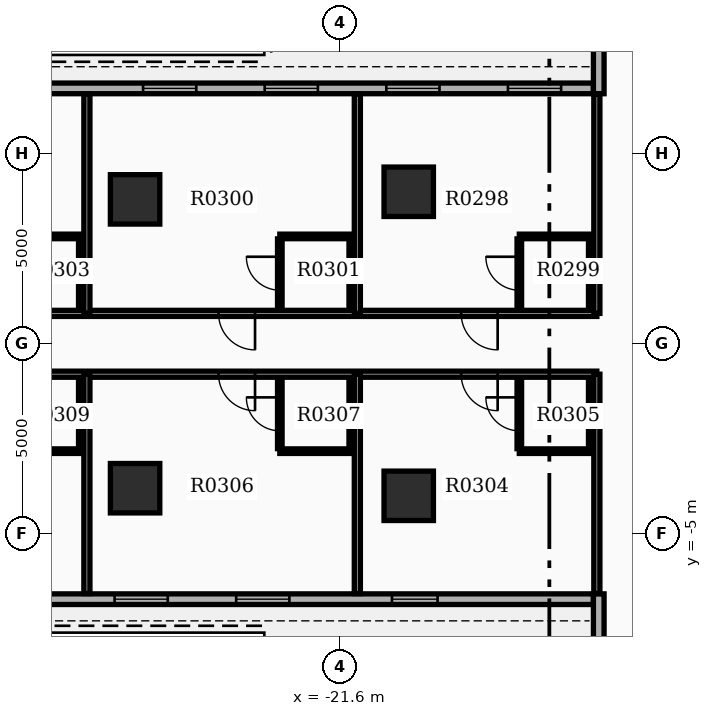
"""IFC4 building model, lengths in metres.
Left out: names, types, materials, properties, quantities, classifications, styles, units other than length and angle.
Written with IfcOpenShell. Run it as: python <this file> out.ifc"""

import sys

from ifc_helpers import new_model, si_unit, direction, frame, frame_2d, origin, origin_2d, place, context, subcontext, project, spatial, rectangle, extrude, element, fill, save


model = new_model("IFC4")
c1 = context("Model", 3, precision=1e-05, world=origin(), true_north=direction((0.0, 1.0)))
c2 = subcontext(c1, "Body", "Model", "MODEL_VIEW")
j1 = project(units=[si_unit("LENGTHUNIT", "METRE"), si_unit("PLANEANGLEUNIT", "RADIAN")], contexts=[c1])
p1 = place(None, origin())
s1 = spatial("IfcSite", under=j1, at=p1, CompositionType="ELEMENT")
p2 = place(p1, origin())
s2 = spatial("IfcBuilding", under=s1, at=p2, CompositionType="ELEMENT")
p3 = place(p2, frame((0.0, 0.0, 23.7)))
s3 = spatial("IfcBuildingStorey", under=s2, at=p3, CompositionType="ELEMENT", Elevation=23.7)
for number, where, z_axis, x_axis in (
    (1, (-19.8, -4.0, 0.0), (0.0, 0.0, 1.0), (1.0, 0.0, 0.0)),
    (2, (-19.8, 4.0, 0.0), (0.0, 0.0, 1.0), (1.0, 0.0, 0.0)),
    (3, (-27.0, -3.8, 0.0), (0.0, 0.0, 1.0), (1.0, 0.0, 0.0)),
    (4, (-27.0, 3.8, 0.0), (0.0, 0.0, 1.0), (1.0, 0.0, 0.0)),
):
    element("IfcColumn", number, at=place(p3, frame(where, z_axis=z_axis, x_axis=x_axis)), inside=s3, PredefinedType="COLUMN", context=c2, shape_type="SweptSolid", body=[
        extrude(rectangle(XDim=1.3, YDim=1.3, at=origin_2d()), origin(), (0.0, 0.0, 1.0), 3.9),
    ])
p4 = place(p3, frame((-14.94, 6.72, 0.0), z_axis=(0.0, 0.0, 1.0), x_axis=(-1.0, 0.0, 0.0)))
e5 = element("IfcWall", 5, at=p4, inside=s3, PredefinedType="STANDARD", context=c2, shape_type="SweptSolid", body=[
    extrude(rectangle(XDim=20.1, YDim=0.28, at=frame_2d((10.05, 0.0))), origin(), (0.0, 0.0, 1.0), 2.91),
])
p5 = place(p4, frame((0.85, 0.0, 0.8)))
e6 = element("IfcOpeningElement", 6, at=p5, cuts=e5, PredefinedType="OPENING", context=c2, shape_type="SweptSolid", body=[
    extrude(rectangle(XDim=1.4, YDim=1.6, at=frame_2d((0.7, 0.8))), frame((0.0, 0.15, 0.0), z_axis=(0.0, -1.0, 0.0), x_axis=(1.0, 0.0, 0.0)), (0.0, 0.0, 1.0), 0.3),
])
p6 = place(p4, frame((4.05, 0.0, 0.8)))
e7 = element("IfcOpeningElement", 7, at=p6, cuts=e5, PredefinedType="OPENING", context=c2, shape_type="SweptSolid", body=[
    extrude(rectangle(XDim=1.4, YDim=1.6, at=frame_2d((0.7, 0.8))), frame((0.0, 0.15, 0.0), z_axis=(0.0, -1.0, 0.0), x_axis=(1.0, 0.0, 0.0)), (0.0, 0.0, 1.0), 0.3),
])
p7 = place(p4, frame((7.25, 0.0, 0.8)))
e8 = element("IfcOpeningElement", 8, at=p7, cuts=e5, PredefinedType="OPENING", context=c2, shape_type="SweptSolid", body=[
    extrude(rectangle(XDim=1.4, YDim=1.6, at=frame_2d((0.7, 0.8))), frame((0.0, 0.15, 0.0), z_axis=(0.0, -1.0, 0.0), x_axis=(1.0, 0.0, 0.0)), (0.0, 0.0, 1.0), 0.3),
])
p8 = place(p4, frame((10.45, 0.0, 0.8)))
e9 = element("IfcOpeningElement", 9, at=p8, cuts=e5, PredefinedType="OPENING", context=c2, shape_type="SweptSolid", body=[
    extrude(rectangle(XDim=1.4, YDim=1.6, at=frame_2d((0.7, 0.8))), frame((0.0, 0.15, 0.0), z_axis=(0.0, -1.0, 0.0), x_axis=(1.0, 0.0, 0.0)), (0.0, 0.0, 1.0), 0.3),
])
p9 = place(p3, frame((-35.04, -6.72, 0.0), z_axis=(0.0, 0.0, 1.0), x_axis=(1.0, 0.0, 0.0)))
e10 = element("IfcWall", 10, at=p9, inside=s3, PredefinedType="STANDARD", context=c2, shape_type="SweptSolid", body=[
    extrude(rectangle(XDim=20.1, YDim=0.28, at=frame_2d((10.05, 0.0))), origin(), (0.0, 0.0, 1.0), 2.91),
])
p10 = place(p9, frame((4.05, 0.0, 0.8)))
e11 = element("IfcOpeningElement", 11, at=p10, cuts=e10, PredefinedType="OPENING", context=c2, shape_type="SweptSolid", body=[
    extrude(rectangle(XDim=1.4, YDim=1.6, at=frame_2d((0.7, 0.8))), frame((0.0, 0.15, 0.0), z_axis=(0.0, -1.0, 0.0), x_axis=(1.0, 0.0, 0.0)), (0.0, 0.0, 1.0), 0.3),
])
p11 = place(p9, frame((7.5, 0.0, 0.8)))
e12 = element("IfcOpeningElement", 12, at=p11, cuts=e10, PredefinedType="OPENING", context=c2, shape_type="SweptSolid", body=[
    extrude(rectangle(XDim=1.4, YDim=1.6, at=frame_2d((0.7, 0.8))), frame((0.0, 0.15, 0.0), z_axis=(0.0, -1.0, 0.0), x_axis=(1.0, 0.0, 0.0)), (0.0, 0.0, 1.0), 0.3),
])
p12 = place(p9, frame((10.7, 0.0, 0.8)))
e13 = element("IfcOpeningElement", 13, at=p12, cuts=e10, PredefinedType="OPENING", context=c2, shape_type="SweptSolid", body=[
    extrude(rectangle(XDim=1.4, YDim=1.6, at=frame_2d((0.7, 0.8))), frame((0.0, 0.15, 0.0), z_axis=(0.0, -1.0, 0.0), x_axis=(1.0, 0.0, 0.0)), (0.0, 0.0, 1.0), 0.3),
])
p13 = place(p9, frame((0.3, 0.0, 0.0)))
e14 = element("IfcOpeningElement", 14, at=p13, cuts=e10, PredefinedType="OPENING", context=c2, shape_type="SweptSolid", body=[
    extrude(rectangle(XDim=0.96, YDim=2.1, at=frame_2d((0.48, 1.05))), frame((0.0, 0.15, 0.0), z_axis=(0.0, -1.0, 0.0), x_axis=(1.0, 0.0, 0.0)), (0.0, 0.0, 1.0), 0.3),
])
p14 = place(p9, frame((14.799, 0.0, 0.85)))
e15 = element("IfcOpeningElement", 15, at=p14, cuts=e10, PredefinedType="OPENING", context=c2, shape_type="SweptSolid", body=[
    extrude(rectangle(XDim=1.2, YDim=1.6, at=frame_2d((0.6, 0.8))), frame((0.0, 0.15, 0.0), z_axis=(0.0, -1.0, 0.0), x_axis=(1.0, 0.0, 0.0)), (0.0, 0.0, 1.0), 0.3),
])
for number, where, z_axis, x_axis in (
    (16, (-14.8, 6.58, 0.0), (0.0, 0.0, 1.0), (0.0, 1.0, 0.0)),
    (17, (-14.8, -6.58, 0.0), (0.0, 0.0, 1.0), (0.0, -1.0, 0.0)),
):
    element("IfcWall", number, at=place(p3, frame(where, z_axis=z_axis, x_axis=x_axis)), inside=s3, PredefinedType="STANDARD", context=c2, shape_type="SweptSolid", body=[
        extrude(rectangle(XDim=6.86, YDim=0.28, at=frame_2d((3.43, 0.0))), origin(), (0.0, 0.0, 1.0), 2.91),
    ])
p15 = place(p3, frame((-14.85, 0.8, 0.0), z_axis=(0.0, 0.0, 1.0), x_axis=(-1.0, 0.0, 0.0)))
e18 = element("IfcWall", 18, at=p15, inside=s3, PredefinedType="PARTITIONING", context=c2, shape_type="SweptSolid", body=[
    extrude(rectangle(XDim=20.182, YDim=0.16, at=frame_2d((10.091, 0.0))), origin(), (0.0, 0.0, 1.0), 2.9),
])
p16 = place(p15, frame((2.61, 0.0, 0.0)))
e19 = element("IfcOpeningElement", 19, at=p16, cuts=e18, PredefinedType="OPENING", context=c2, shape_type="SweptSolid", body=[
    extrude(rectangle(XDim=0.96, YDim=2.15, at=frame_2d((0.48, 1.075))), frame((0.0, 0.09, 0.0), z_axis=(0.0, -1.0, 0.0), x_axis=(1.0, 0.0, 0.0)), (0.0, 0.0, 1.0), 0.18),
])
p17 = place(p15, frame((8.994, 0.0, 0.0)))
e20 = element("IfcOpeningElement", 20, at=p17, cuts=e18, PredefinedType="OPENING", context=c2, shape_type="SweptSolid", body=[
    extrude(rectangle(XDim=0.96, YDim=2.15, at=frame_2d((0.48, 1.075))), frame((0.0, 0.09, 0.0), z_axis=(0.0, -1.0, 0.0), x_axis=(1.0, 0.0, 0.0)), (0.0, 0.0, 1.0), 0.18),
])
p18 = place(p15, frame((18.93, 0.0, 0.0)))
e21 = element("IfcOpeningElement", 21, at=p18, cuts=e18, PredefinedType="OPENING", context=c2, shape_type="SweptSolid", body=[
    extrude(rectangle(XDim=0.96, YDim=2.15, at=frame_2d((0.48, 1.075))), frame((0.0, 0.09, 0.0), z_axis=(0.0, -1.0, 0.0), x_axis=(1.0, 0.0, 0.0)), (0.0, 0.0, 1.0), 0.18),
])
for number, where, z_axis, x_axis in (
    (22, (-14.85, 0.8, 0.0), (0.0, 0.0, 1.0), (0.0, 1.0, 0.0)),
    (23, (-21.152, 0.8, 0.0), (0.0, 0.0, 1.0), (0.0, 1.0, 0.0)),
):
    element("IfcWall", number, at=place(p3, frame(where, z_axis=z_axis, x_axis=x_axis)), inside=s3, PredefinedType="PARTITIONING", context=c2, shape_type="SweptSolid", body=[
        extrude(rectangle(XDim=5.772, YDim=0.16, at=frame_2d((2.886, 0.0))), origin(), (0.0, 0.0, 1.0), 2.9),
    ])
p19 = place(p3, frame((-16.89, 0.94, 0.0), z_axis=(0.0, 0.0, 1.0), x_axis=(0.0, 1.0, 0.0)))
e24 = element("IfcWall", 24, at=p19, inside=s3, PredefinedType="PARTITIONING", context=c2, shape_type="SweptSolid", body=[
    extrude(rectangle(XDim=1.82, YDim=0.12, at=frame_2d((0.91, 0.0))), origin(), (0.0, 0.0, 1.0), 2.9),
])
p20 = place(p19, frame((0.47, 0.0, 0.0)))
e25 = element("IfcOpeningElement", 25, at=p20, cuts=e24, PredefinedType="OPENING", context=c2, shape_type="SweptSolid", body=[
    extrude(rectangle(XDim=0.88, YDim=2.1, at=frame_2d((0.44, 1.05))), frame((0.0, 0.07, 0.0), z_axis=(0.0, -1.0, 0.0), x_axis=(1.0, 0.0, 0.0)), (0.0, 0.0, 1.0), 0.14),
])
p21 = place(p3, frame((-15.01, 0.94, 0.0), z_axis=(0.0, 0.0, 1.0), x_axis=(0.0, 1.0, 0.0)))
e26 = element("IfcWall", 26, at=p21, inside=s3, PredefinedType="PARTITIONING", context=c2, shape_type="SweptSolid", body=[
    extrude(rectangle(XDim=1.82, YDim=0.12, at=frame_2d((0.91, 0.0))), origin(), (0.0, 0.0, 1.0), 2.9),
])
p22 = place(p3, frame((-15.01, 2.825, 0.0), z_axis=(0.0, 0.0, 1.0), x_axis=(-1.0, 0.0, 0.0)))
e27 = element("IfcWall", 27, at=p22, inside=s3, PredefinedType="PARTITIONING", context=c2, shape_type="SweptSolid", body=[
    extrude(rectangle(XDim=1.88, YDim=0.12, at=frame_2d((0.94, 0.0))), origin(), (0.0, 0.0, 1.0), 2.9),
])
p23 = place(p3, frame((-28.268, 0.8, 0.0), z_axis=(0.0, 0.0, 1.0), x_axis=(0.0, 1.0, 0.0)))
e28 = element("IfcWall", 28, at=p23, inside=s3, PredefinedType="PARTITIONING", context=c2, shape_type="SweptSolid", body=[
    extrude(rectangle(XDim=5.772, YDim=0.16, at=frame_2d((2.886, 0.0))), origin(), (0.0, 0.0, 1.0), 2.9),
])
p24 = place(p3, frame((-23.192, 0.94, 0.0), z_axis=(0.0, 0.0, 1.0), x_axis=(0.0, 1.0, 0.0)))
e29 = element("IfcWall", 29, at=p24, inside=s3, PredefinedType="PARTITIONING", context=c2, shape_type="SweptSolid", body=[
    extrude(rectangle(XDim=1.82, YDim=0.12, at=frame_2d((0.91, 0.0))), origin(), (0.0, 0.0, 1.0), 2.9),
])
p25 = place(p24, frame((0.47, 0.0, 0.0)))
e30 = element("IfcOpeningElement", 30, at=p25, cuts=e29, PredefinedType="OPENING", context=c2, shape_type="SweptSolid", body=[
    extrude(rectangle(XDim=0.88, YDim=2.1, at=frame_2d((0.44, 1.05))), frame((0.0, 0.07, 0.0), z_axis=(0.0, -1.0, 0.0), x_axis=(1.0, 0.0, 0.0)), (0.0, 0.0, 1.0), 0.14),
])
p26 = place(p3, frame((-21.312, 0.94, 0.0), z_axis=(0.0, 0.0, 1.0), x_axis=(0.0, 1.0, 0.0)))
e31 = element("IfcWall", 31, at=p26, inside=s3, PredefinedType="PARTITIONING", context=c2, shape_type="SweptSolid", body=[
    extrude(rectangle(XDim=1.82, YDim=0.12, at=frame_2d((0.91, 0.0))), origin(), (0.0, 0.0, 1.0), 2.9),
])
p27 = place(p3, frame((-21.312, 2.825, 0.0), z_axis=(0.0, 0.0, 1.0), x_axis=(-1.0, 0.0, 0.0)))
e32 = element("IfcWall", 32, at=p27, inside=s3, PredefinedType="PARTITIONING", context=c2, shape_type="SweptSolid", body=[
    extrude(rectangle(XDim=1.88, YDim=0.12, at=frame_2d((0.94, 0.0))), origin(), (0.0, 0.0, 1.0), 2.9),
])
p28 = place(p3, frame((-28.428, 0.94, 0.0), z_axis=(0.0, 0.0, 1.0), x_axis=(0.0, 1.0, 0.0)))
e33 = element("IfcWall", 33, at=p28, inside=s3, PredefinedType="PARTITIONING", context=c2, shape_type="SweptSolid", body=[
    extrude(rectangle(XDim=1.82, YDim=0.12, at=frame_2d((0.91, 0.0))), origin(), (0.0, 0.0, 1.0), 2.9),
])
p29 = place(p3, frame((-28.428, 2.825, 0.0), z_axis=(0.0, 0.0, 1.0), x_axis=(-1.0, 0.0, 0.0)))
e34 = element("IfcWall", 34, at=p29, inside=s3, PredefinedType="PARTITIONING", context=c2, shape_type="SweptSolid", body=[
    extrude(rectangle(XDim=1.88, YDim=0.12, at=frame_2d((0.94, 0.0))), origin(), (0.0, 0.0, 1.0), 2.9),
])
p30 = place(p3, frame((-14.85, -0.8, 0.0), z_axis=(0.0, 0.0, 1.0), x_axis=(-1.0, 0.0, 0.0)))
e35 = element("IfcWall", 35, at=p30, inside=s3, PredefinedType="PARTITIONING", context=c2, shape_type="SweptSolid", body=[
    extrude(rectangle(XDim=20.182, YDim=0.16, at=frame_2d((10.091, 0.0))), origin(), (0.0, 0.0, 1.0), 2.9),
])
p31 = place(p30, frame((2.61, 0.0, 0.0)))
e36 = element("IfcOpeningElement", 36, at=p31, cuts=e35, PredefinedType="OPENING", context=c2, shape_type="SweptSolid", body=[
    extrude(rectangle(XDim=0.96, YDim=2.15, at=frame_2d((0.48, 1.075))), frame((0.0, 0.09, 0.0), z_axis=(0.0, -1.0, 0.0), x_axis=(1.0, 0.0, 0.0)), (0.0, 0.0, 1.0), 0.18),
])
p32 = place(p30, frame((8.994, 0.0, 0.0)))
e37 = element("IfcOpeningElement", 37, at=p32, cuts=e35, PredefinedType="OPENING", context=c2, shape_type="SweptSolid", body=[
    extrude(rectangle(XDim=0.96, YDim=2.15, at=frame_2d((0.48, 1.075))), frame((0.0, 0.09, 0.0), z_axis=(0.0, -1.0, 0.0), x_axis=(1.0, 0.0, 0.0)), (0.0, 0.0, 1.0), 0.18),
])
p33 = place(p30, frame((18.93, 0.0, 0.0)))
e38 = element("IfcOpeningElement", 38, at=p33, cuts=e35, PredefinedType="OPENING", context=c2, shape_type="SweptSolid", body=[
    extrude(rectangle(XDim=0.96, YDim=2.15, at=frame_2d((0.48, 1.075))), frame((0.0, 0.09, 0.0), z_axis=(0.0, -1.0, 0.0), x_axis=(1.0, 0.0, 0.0)), (0.0, 0.0, 1.0), 0.18),
])
for number, where, z_axis, x_axis in (
    (39, (-14.85, -0.8, 0.0), (0.0, 0.0, 1.0), (0.0, -1.0, 0.0)),
    (40, (-21.152, -0.8, 0.0), (0.0, 0.0, 1.0), (0.0, -1.0, 0.0)),
):
    element("IfcWall", number, at=place(p3, frame(where, z_axis=z_axis, x_axis=x_axis)), inside=s3, PredefinedType="PARTITIONING", context=c2, shape_type="SweptSolid", body=[
        extrude(rectangle(XDim=5.772, YDim=0.16, at=frame_2d((2.886, 0.0))), origin(), (0.0, 0.0, 1.0), 2.9),
    ])
p34 = place(p3, frame((-16.89, -2.76, 0.0), z_axis=(0.0, 0.0, 1.0), x_axis=(0.0, 1.0, 0.0)))
e41 = element("IfcWall", 41, at=p34, inside=s3, PredefinedType="PARTITIONING", context=c2, shape_type="SweptSolid", body=[
    extrude(rectangle(XDim=1.82, YDim=0.12, at=frame_2d((0.91, 0.0))), origin(), (0.0, 0.0, 1.0), 2.9),
])
p35 = place(p34, frame((0.47, 0.0, 0.0)))
e42 = element("IfcOpeningElement", 42, at=p35, cuts=e41, PredefinedType="OPENING", context=c2, shape_type="SweptSolid", body=[
    extrude(rectangle(XDim=0.88, YDim=2.1, at=frame_2d((0.44, 1.05))), frame((0.0, 0.07, 0.0), z_axis=(0.0, -1.0, 0.0), x_axis=(1.0, 0.0, 0.0)), (0.0, 0.0, 1.0), 0.14),
])
p36 = place(p3, frame((-15.01, -2.76, 0.0), z_axis=(0.0, 0.0, 1.0), x_axis=(0.0, 1.0, 0.0)))
e43 = element("IfcWall", 43, at=p36, inside=s3, PredefinedType="PARTITIONING", context=c2, shape_type="SweptSolid", body=[
    extrude(rectangle(XDim=1.82, YDim=0.12, at=frame_2d((0.91, 0.0))), origin(), (0.0, 0.0, 1.0), 2.9),
])
p37 = place(p3, frame((-15.01, -2.825, 0.0), z_axis=(0.0, 0.0, 1.0), x_axis=(-1.0, 0.0, 0.0)))
e44 = element("IfcWall", 44, at=p37, inside=s3, PredefinedType="PARTITIONING", context=c2, shape_type="SweptSolid", body=[
    extrude(rectangle(XDim=1.88, YDim=0.12, at=frame_2d((0.94, 0.0))), origin(), (0.0, 0.0, 1.0), 2.9),
])
p38 = place(p3, frame((-28.268, -0.8, 0.0), z_axis=(0.0, 0.0, 1.0), x_axis=(0.0, -1.0, 0.0)))
e45 = element("IfcWall", 45, at=p38, inside=s3, PredefinedType="PARTITIONING", context=c2, shape_type="SweptSolid", body=[
    extrude(rectangle(XDim=5.772, YDim=0.16, at=frame_2d((2.886, 0.0))), origin(), (0.0, 0.0, 1.0), 2.9),
])
p39 = place(p3, frame((-23.192, -2.76, 0.0), z_axis=(0.0, 0.0, 1.0), x_axis=(0.0, 1.0, 0.0)))
e46 = element("IfcWall", 46, at=p39, inside=s3, PredefinedType="PARTITIONING", context=c2, shape_type="SweptSolid", body=[
    extrude(rectangle(XDim=1.82, YDim=0.12, at=frame_2d((0.91, 0.0))), origin(), (0.0, 0.0, 1.0), 2.9),
])
p40 = place(p39, frame((0.47, 0.0, 0.0)))
e47 = element("IfcOpeningElement", 47, at=p40, cuts=e46, PredefinedType="OPENING", context=c2, shape_type="SweptSolid", body=[
    extrude(rectangle(XDim=0.88, YDim=2.1, at=frame_2d((0.44, 1.05))), frame((0.0, 0.07, 0.0), z_axis=(0.0, -1.0, 0.0), x_axis=(1.0, 0.0, 0.0)), (0.0, 0.0, 1.0), 0.14),
])
p41 = place(p3, frame((-21.312, -2.76, 0.0), z_axis=(0.0, 0.0, 1.0), x_axis=(0.0, 1.0, 0.0)))
e48 = element("IfcWall", 48, at=p41, inside=s3, PredefinedType="PARTITIONING", context=c2, shape_type="SweptSolid", body=[
    extrude(rectangle(XDim=1.82, YDim=0.12, at=frame_2d((0.91, 0.0))), origin(), (0.0, 0.0, 1.0), 2.9),
])
p42 = place(p3, frame((-21.312, -2.825, 0.0), z_axis=(0.0, 0.0, 1.0), x_axis=(-1.0, 0.0, 0.0)))
e49 = element("IfcWall", 49, at=p42, inside=s3, PredefinedType="PARTITIONING", context=c2, shape_type="SweptSolid", body=[
    extrude(rectangle(XDim=1.88, YDim=0.12, at=frame_2d((0.94, 0.0))), origin(), (0.0, 0.0, 1.0), 2.9),
])
p43 = place(p3, frame((-28.428, -2.76, 0.0), z_axis=(0.0, 0.0, 1.0), x_axis=(0.0, 1.0, 0.0)))
e50 = element("IfcWall", 50, at=p43, inside=s3, PredefinedType="PARTITIONING", context=c2, shape_type="SweptSolid", body=[
    extrude(rectangle(XDim=1.82, YDim=0.12, at=frame_2d((0.91, 0.0))), origin(), (0.0, 0.0, 1.0), 2.9),
])
p44 = place(p3, frame((-28.428, -2.825, 0.0), z_axis=(0.0, 0.0, 1.0), x_axis=(-1.0, 0.0, 0.0)))
e51 = element("IfcWall", 51, at=p44, inside=s3, PredefinedType="PARTITIONING", context=c2, shape_type="SweptSolid", body=[
    extrude(rectangle(XDim=1.88, YDim=0.12, at=frame_2d((0.94, 0.0))), origin(), (0.0, 0.0, 1.0), 2.9),
])
p45 = place(p5, origin())
e52 = element("IfcWindow", 52, at=p45, inside=s3, PartitioningType="SINGLE_PANEL", PredefinedType="WINDOW", context=c2, shape_type="SweptSolid", body=[
    extrude(rectangle(XDim=1.4, YDim=1.6, at=frame_2d((0.7, 0.8))), frame((0.0, 0.03, 0.0), z_axis=(0.0, -1.0, 0.0), x_axis=(1.0, 0.0, 0.0)), (0.0, 0.0, 1.0), 0.06),
])
fill(e6, e52)
p46 = place(p6, origin())
e53 = element("IfcWindow", 53, at=p46, inside=s3, PartitioningType="SINGLE_PANEL", PredefinedType="WINDOW", context=c2, shape_type="SweptSolid", body=[
    extrude(rectangle(XDim=1.4, YDim=1.6, at=frame_2d((0.7, 0.8))), frame((0.0, 0.03, 0.0), z_axis=(0.0, -1.0, 0.0), x_axis=(1.0, 0.0, 0.0)), (0.0, 0.0, 1.0), 0.06),
])
fill(e7, e53)
p47 = place(p7, origin())
e54 = element("IfcWindow", 54, at=p47, inside=s3, PartitioningType="SINGLE_PANEL", PredefinedType="WINDOW", context=c2, shape_type="SweptSolid", body=[
    extrude(rectangle(XDim=1.4, YDim=1.6, at=frame_2d((0.7, 0.8))), frame((0.0, 0.03, 0.0), z_axis=(0.0, -1.0, 0.0), x_axis=(1.0, 0.0, 0.0)), (0.0, 0.0, 1.0), 0.06),
])
fill(e8, e54)
p48 = place(p8, origin())
e55 = element("IfcWindow", 55, at=p48, inside=s3, PartitioningType="SINGLE_PANEL", PredefinedType="WINDOW", context=c2, shape_type="SweptSolid", body=[
    extrude(rectangle(XDim=1.4, YDim=1.6, at=frame_2d((0.7, 0.8))), frame((0.0, 0.03, 0.0), z_axis=(0.0, -1.0, 0.0), x_axis=(1.0, 0.0, 0.0)), (0.0, 0.0, 1.0), 0.06),
])
fill(e9, e55)
p49 = place(p11, origin())
e56 = element("IfcWindow", 56, at=p49, inside=s3, PartitioningType="SINGLE_PANEL", PredefinedType="WINDOW", context=c2, shape_type="SweptSolid", body=[
    extrude(rectangle(XDim=1.4, YDim=1.6, at=frame_2d((0.7, 0.8))), frame((0.0, 0.03, 0.0), z_axis=(0.0, -1.0, 0.0), x_axis=(1.0, 0.0, 0.0)), (0.0, 0.0, 1.0), 0.06),
])
fill(e12, e56)
p50 = place(p12, origin())
e57 = element("IfcWindow", 57, at=p50, inside=s3, PartitioningType="SINGLE_PANEL", PredefinedType="WINDOW", context=c2, shape_type="SweptSolid", body=[
    extrude(rectangle(XDim=1.4, YDim=1.6, at=frame_2d((0.7, 0.8))), frame((0.0, 0.03, 0.0), z_axis=(0.0, -1.0, 0.0), x_axis=(1.0, 0.0, 0.0)), (0.0, 0.0, 1.0), 0.06),
])
fill(e13, e57)
p51 = place(p14, origin())
e58 = element("IfcWindow", 58, at=p51, inside=s3, PartitioningType="SINGLE_PANEL", PredefinedType="WINDOW", context=c2, shape_type="SweptSolid", body=[
    extrude(rectangle(XDim=1.2, YDim=1.6, at=frame_2d((0.6, 0.8))), frame((0.0, 0.03, 0.0), z_axis=(0.0, -1.0, 0.0), x_axis=(1.0, 0.0, 0.0)), (0.0, 0.0, 1.0), 0.06),
])
fill(e15, e58)
p52 = place(p16, origin())
e59 = element("IfcDoor", 59, at=p52, inside=s3, OperationType="SINGLE_SWING_LEFT", PredefinedType="DOOR", context=c2, shape_type="SweptSolid", body=[
    extrude(rectangle(XDim=0.96, YDim=2.15, at=frame_2d((0.48, 1.075))), frame((0.0, 0.025, 0.0), z_axis=(0.0, -1.0, 0.0), x_axis=(1.0, 0.0, 0.0)), (0.0, 0.0, 1.0), 0.05),
])
fill(e19, e59)
p53 = place(p20, origin())
e60 = element("IfcDoor", 60, at=p53, inside=s3, OperationType="SINGLE_SWING_RIGHT", PredefinedType="DOOR", context=c2, shape_type="SweptSolid", body=[
    extrude(rectangle(XDim=0.88, YDim=2.1, at=frame_2d((0.44, 1.05))), frame((0.0, 0.025, 0.0), z_axis=(0.0, -1.0, 0.0), x_axis=(1.0, 0.0, 0.0)), (0.0, 0.0, 1.0), 0.05),
])
fill(e25, e60)
p54 = place(p17, origin())
e61 = element("IfcDoor", 61, at=p54, inside=s3, OperationType="SINGLE_SWING_LEFT", PredefinedType="DOOR", context=c2, shape_type="SweptSolid", body=[
    extrude(rectangle(XDim=0.96, YDim=2.15, at=frame_2d((0.48, 1.075))), frame((0.0, 0.025, 0.0), z_axis=(0.0, -1.0, 0.0), x_axis=(1.0, 0.0, 0.0)), (0.0, 0.0, 1.0), 0.05),
])
fill(e20, e61)
p55 = place(p25, origin())
e62 = element("IfcDoor", 62, at=p55, inside=s3, OperationType="SINGLE_SWING_RIGHT", PredefinedType="DOOR", context=c2, shape_type="SweptSolid", body=[
    extrude(rectangle(XDim=0.88, YDim=2.1, at=frame_2d((0.44, 1.05))), frame((0.0, 0.025, 0.0), z_axis=(0.0, -1.0, 0.0), x_axis=(1.0, 0.0, 0.0)), (0.0, 0.0, 1.0), 0.05),
])
fill(e30, e62)
p56 = place(p31, origin())
e63 = element("IfcDoor", 63, at=p56, inside=s3, OperationType="SINGLE_SWING_LEFT", PredefinedType="DOOR", context=c2, shape_type="SweptSolid", body=[
    extrude(rectangle(XDim=0.96, YDim=2.15, at=frame_2d((0.48, 1.075))), frame((0.0, 0.025, 0.0), z_axis=(0.0, -1.0, 0.0), x_axis=(1.0, 0.0, 0.0)), (0.0, 0.0, 1.0), 0.05),
])
fill(e36, e63)
p57 = place(p35, origin())
e64 = element("IfcDoor", 64, at=p57, inside=s3, OperationType="SINGLE_SWING_RIGHT", PredefinedType="DOOR", context=c2, shape_type="SweptSolid", body=[
    extrude(rectangle(XDim=0.88, YDim=2.1, at=frame_2d((0.44, 1.05))), frame((0.0, 0.025, 0.0), z_axis=(0.0, -1.0, 0.0), x_axis=(1.0, 0.0, 0.0)), (0.0, 0.0, 1.0), 0.05),
])
fill(e42, e64)
p58 = place(p32, origin())
e65 = element("IfcDoor", 65, at=p58, inside=s3, OperationType="SINGLE_SWING_LEFT", PredefinedType="DOOR", context=c2, shape_type="SweptSolid", body=[
    extrude(rectangle(XDim=0.96, YDim=2.15, at=frame_2d((0.48, 1.075))), frame((0.0, 0.025, 0.0), z_axis=(0.0, -1.0, 0.0), x_axis=(1.0, 0.0, 0.0)), (0.0, 0.0, 1.0), 0.05),
])
fill(e37, e65)
p59 = place(p40, origin())
e66 = element("IfcDoor", 66, at=p59, inside=s3, OperationType="SINGLE_SWING_RIGHT", PredefinedType="DOOR", context=c2, shape_type="SweptSolid", body=[
    extrude(rectangle(XDim=0.88, YDim=2.1, at=frame_2d((0.44, 1.05))), frame((0.0, 0.025, 0.0), z_axis=(0.0, -1.0, 0.0), x_axis=(1.0, 0.0, 0.0)), (0.0, 0.0, 1.0), 0.05),
])
fill(e47, e66)
save(model, sys.argv[1])
